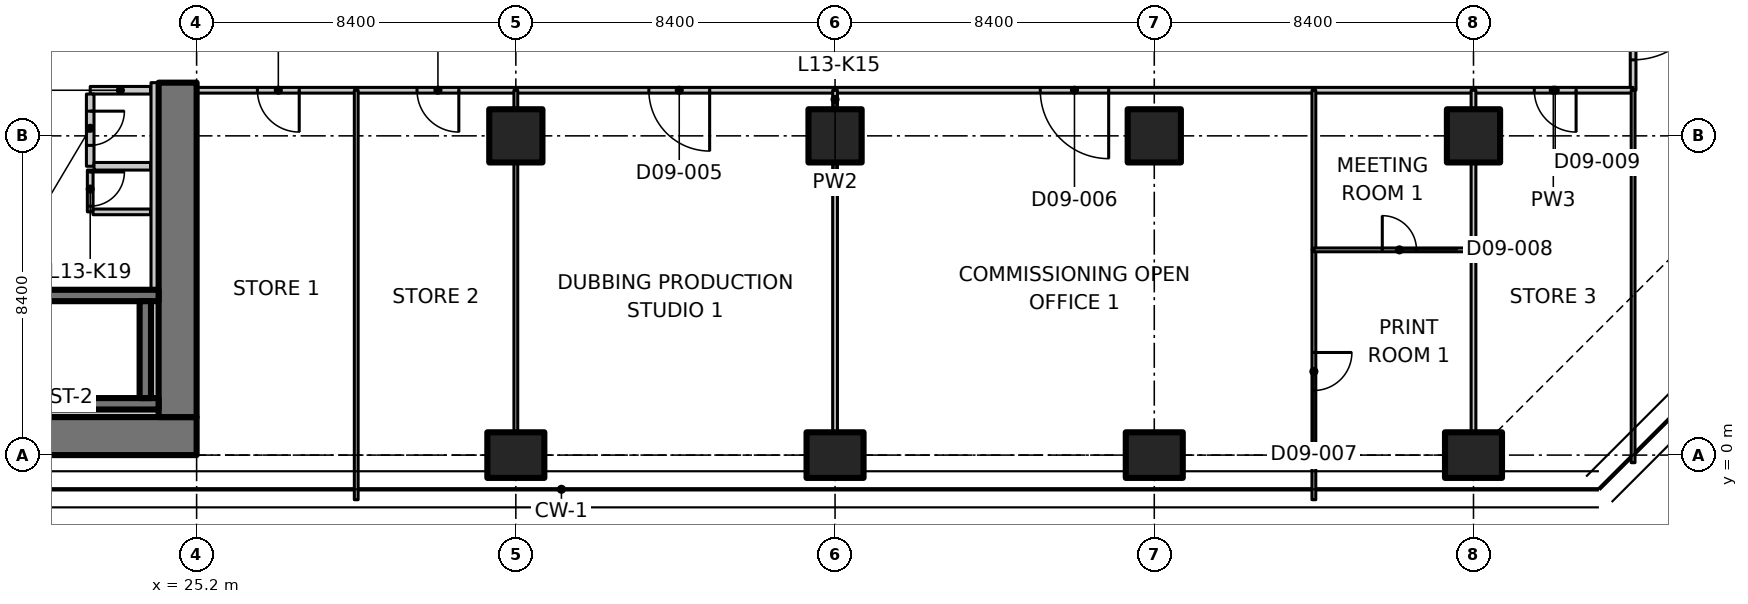
"""IFC4 building model, lengths in metres.
Left out: names, types, materials, properties, quantities, classifications, styles, units other than length and angle.
Written with IfcOpenShell. Run it as: python <this file> out.ifc"""

import sys

from ifc_helpers import new_model, si_unit, direction, frame, frame_2d, origin, origin_2d, place, context, subcontext, project, spatial, polyline, rectangle, outline, extrude, element, fill, save


model = new_model("IFC4")
c1 = context("Model", 3, precision=1e-05, world=origin(), true_north=direction((0.0, 1.0)))
c2 = subcontext(c1, "Body", "Model", "MODEL_VIEW")
j1 = project(units=[si_unit("LENGTHUNIT", "METRE"), si_unit("PLANEANGLEUNIT", "RADIAN")], contexts=[c1])
p1 = place(None, origin())
s1 = spatial("IfcSite", under=j1, at=p1, CompositionType="ELEMENT")
p2 = place(p1, origin())
s2 = spatial("IfcBuilding", under=s1, at=p2, CompositionType="ELEMENT")
p3 = place(p2, frame((0.0, 0.0, 61.7)))
s3 = spatial("IfcBuildingStorey", under=s2, at=p3, CompositionType="ELEMENT", Elevation=61.7)
p4 = place(p3, frame((33.6, 0.0, 0.0), z_axis=(0.0, 0.0, 1.0), x_axis=(0.0, 1.0, 0.0)))
e1 = element("IfcColumn", 1, at=p4, inside=s3, PredefinedType="COLUMN", context=c2, shape_type="SweptSolid", body=[
    extrude(rectangle(XDim=1.2, YDim=1.5, at=origin_2d()), origin(), (0.0, 0.0, 1.0), 3.35),
])
p5 = place(p3, frame((33.6, 8.4, 0.0), z_axis=(0.0, 0.0, 1.0), x_axis=(1.0, 0.0, 0.0)))
e2 = element("IfcColumn", 2, at=p5, inside=s3, PredefinedType="COLUMN", context=c2, shape_type="SweptSolid", body=[
    extrude(rectangle(XDim=1.4, YDim=1.4, at=origin_2d()), origin(), (0.0, 0.0, 1.0), 3.35),
])
p6 = place(p3, frame((42.0, 0.0, 0.0), z_axis=(0.0, 0.0, 1.0), x_axis=(0.0, 1.0, 0.0)))
e3 = element("IfcColumn", 3, at=p6, inside=s3, PredefinedType="COLUMN", context=c2, shape_type="SweptSolid", body=[
    extrude(rectangle(XDim=1.2, YDim=1.5, at=origin_2d()), origin(), (0.0, 0.0, 1.0), 3.35),
])
p7 = place(p3, frame((42.0, 8.4, 0.0), z_axis=(0.0, 0.0, 1.0), x_axis=(1.0, 0.0, 0.0)))
e4 = element("IfcColumn", 4, at=p7, inside=s3, PredefinedType="COLUMN", context=c2, shape_type="SweptSolid", body=[
    extrude(rectangle(XDim=1.4, YDim=1.4, at=origin_2d()), origin(), (0.0, 0.0, 1.0), 3.35),
])
p8 = place(p3, frame((50.4, 0.0, 0.0), z_axis=(0.0, 0.0, 1.0), x_axis=(0.0, 1.0, 0.0)))
e5 = element("IfcColumn", 5, at=p8, inside=s3, PredefinedType="COLUMN", context=c2, shape_type="SweptSolid", body=[
    extrude(rectangle(XDim=1.2, YDim=1.5, at=origin_2d()), origin(), (0.0, 0.0, 1.0), 3.35),
])
p9 = place(p3, frame((50.4, 8.4, 0.0), z_axis=(0.0, 0.0, 1.0), x_axis=(1.0, 0.0, 0.0)))
e6 = element("IfcColumn", 6, at=p9, inside=s3, PredefinedType="COLUMN", context=c2, shape_type="SweptSolid", body=[
    extrude(rectangle(XDim=1.4, YDim=1.4, at=origin_2d()), origin(), (0.0, 0.0, 1.0), 3.35),
])
p10 = place(p3, frame((58.8, 0.0, 0.0), z_axis=(0.0, 0.0, 1.0), x_axis=(0.0, 1.0, 0.0)))
e7 = element("IfcColumn", 7, at=p10, inside=s3, PredefinedType="COLUMN", context=c2, shape_type="SweptSolid", body=[
    extrude(rectangle(XDim=1.2, YDim=1.5, at=origin_2d()), origin(), (0.0, 0.0, 1.0), 3.35),
])
p11 = place(p3, frame((58.8, 8.4, 0.0), z_axis=(0.0, 0.0, 1.0), x_axis=(1.0, 0.0, 0.0)))
e8 = element("IfcColumn", 8, at=p11, inside=s3, PredefinedType="COLUMN", context=c2, shape_type="SweptSolid", body=[
    extrude(rectangle(XDim=1.4, YDim=1.4, at=origin_2d()), origin(), (0.0, 0.0, 1.0), 3.35),
])
p12 = place(p3, frame((6.936, 0.5, 0.0), z_axis=(0.0, 0.0, 1.0), x_axis=(1.0, 0.0, 0.0)))
e9 = element("IfcWall", 9, at=p12, inside=s3, PredefinedType="SHEAR", context=c2, shape_type="SweptSolid", body=[
    extrude(rectangle(XDim=18.264, YDim=1.0, at=frame_2d((9.132, 0.0))), origin(), (0.0, 0.0, 1.0), 3.35),
])
p13 = place(p3, frame((24.7, 1.0, 0.0), z_axis=(0.0, 0.0, 1.0), x_axis=(0.0, 1.0, 0.0)))
e10 = element("IfcWall", 10, at=p13, inside=s3, PredefinedType="SHEAR", context=c2, shape_type="SweptSolid", body=[
    extrude(rectangle(XDim=8.8, YDim=1.0, at=frame_2d((4.4, 0.0))), origin(), (0.0, 0.0, 1.0), 3.35),
])
p14 = place(p3, frame((15.8, 1.35, 0.0), z_axis=(0.0, 0.0, 1.0), x_axis=(1.0, 0.0, 0.0)))
e11 = element("IfcWall", 11, at=p14, inside=s3, PredefinedType="SHEAR", context=c2, shape_type="SweptSolid", body=[
    extrude(rectangle(XDim=8.4, YDim=0.3, at=frame_2d((4.2, 0.0))), origin(), (0.0, 0.0, 1.0), 3.35),
])
p15 = place(p3, frame((15.8, 4.2, 0.0), z_axis=(0.0, 0.0, 1.0), x_axis=(1.0, 0.0, 0.0)))
e12 = element("IfcWall", 12, at=p15, inside=s3, PredefinedType="SHEAR", context=c2, shape_type="SweptSolid", body=[
    extrude(rectangle(XDim=8.4, YDim=0.3, at=frame_2d((4.2, 0.0))), origin(), (0.0, 0.0, 1.0), 3.35),
])
p16 = place(p15, frame((0.4, 0.0, 0.0)))
e13 = element("IfcOpeningElement", 13, at=p16, cuts=e12, PredefinedType="OPENING", context=c2, shape_type="SweptSolid", body=[
    extrude(rectangle(XDim=1.0, YDim=2.1, at=frame_2d((0.5, 1.05))), frame((0.0, 0.16, 0.0), z_axis=(0.0, -1.0, 0.0), x_axis=(1.0, 0.0, 0.0)), (0.0, 0.0, 1.0), 0.32),
])
p17 = place(p3, frame((23.85, 1.5, 0.0), z_axis=(0.0, 0.0, 1.0), x_axis=(0.0, 1.0, 0.0)))
e14 = element("IfcWall", 14, at=p17, inside=s3, PredefinedType="SHEAR", context=c2, shape_type="SweptSolid", body=[
    extrude(rectangle(XDim=2.55, YDim=0.3, at=frame_2d((1.275, 0.0))), origin(), (0.0, 0.0, 1.0), 3.35),
])
p18 = place(p3, frame((23.988, 9.6, 0.0), z_axis=(0.0, 0.0, 1.0), x_axis=(-1.0, 0.0, 0.0)))
e15 = element("IfcWall", 15, at=p18, inside=s3, PredefinedType="PARTITIONING", context=c2, shape_type="SweptSolid", body=[
    extrude(rectangle(XDim=1.588, YDim=0.2, at=frame_2d((0.794, 0.0))), origin(), (0.0, 0.0, 1.0), 3.35),
])
p19 = place(p3, frame((22.4, 9.5, 0.0), z_axis=(0.0, 0.0, 1.0), x_axis=(0.0, -1.0, 0.0)))
e16 = element("IfcWall", 16, at=p19, inside=s3, PredefinedType="PARTITIONING", context=c2, shape_type="SweptSolid", body=[
    extrude(rectangle(XDim=1.9, YDim=0.2, at=frame_2d((0.95, 0.0))), origin(), (0.0, 0.0, 1.0), 3.35),
])
p20 = place(p19, frame((0.45, 0.0, 0.0)))
e17 = element("IfcOpeningElement", 17, at=p20, cuts=e16, PredefinedType="OPENING", context=c2, shape_type="SweptSolid", body=[
    extrude(rectangle(XDim=0.9, YDim=2.1, at=frame_2d((0.45, 1.05))), frame((0.0, 0.11, 0.0), z_axis=(0.0, -1.0, 0.0), x_axis=(1.0, 0.0, 0.0)), (0.0, 0.0, 1.0), 0.22),
])
p21 = place(p3, frame((22.5, 7.6, 0.0), z_axis=(0.0, 0.0, 1.0), x_axis=(1.0, 0.0, 0.0)))
e18 = element("IfcWall", 18, at=p21, inside=s3, PredefinedType="PARTITIONING", context=c2, shape_type="SweptSolid", body=[
    extrude(rectangle(XDim=1.488, YDim=0.2, at=frame_2d((0.744, 0.0))), origin(), (0.0, 0.0, 1.0), 3.35),
])
p22 = place(p3, frame((22.4, 7.5, 0.0), z_axis=(0.0, 0.0, 1.0), x_axis=(0.0, -1.0, 0.0)))
e19 = element("IfcWall", 19, at=p22, inside=s3, PredefinedType="PARTITIONING", context=c2, shape_type="SweptSolid", body=[
    extrude(rectangle(XDim=1.1, YDim=0.15, at=frame_2d((0.55, 0.0))), origin(), (0.0, 0.0, 1.0), 3.35),
])
p23 = place(p22, frame((0.05, 0.0, 0.0)))
e20 = element("IfcOpeningElement", 20, at=p23, cuts=e19, PredefinedType="OPENING", context=c2, shape_type="SweptSolid", body=[
    extrude(rectangle(XDim=0.9, YDim=2.1, at=frame_2d((0.45, 1.05))), frame((0.0, 0.085, 0.0), z_axis=(0.0, -1.0, 0.0), x_axis=(1.0, 0.0, 0.0)), (0.0, 0.0, 1.0), 0.17),
])
p24 = place(p3, frame((22.475, 6.4, 0.0), z_axis=(0.0, 0.0, 1.0), x_axis=(1.0, 0.0, 0.0)))
e21 = element("IfcWall", 21, at=p24, inside=s3, PredefinedType="PARTITIONING", context=c2, shape_type="SweptSolid", body=[
    extrude(rectangle(XDim=1.513, YDim=0.15, at=frame_2d((0.756, 0.0))), origin(), (0.0, 0.0, 1.0), 3.35),
])
p25 = place(p3, frame((13.35, 1.1, 0.0), z_axis=(0.0, 0.0, 1.0), x_axis=(1.0, 0.0, 0.0)))
e22 = element("IfcWall", 22, at=p25, inside=s3, PredefinedType="PARTITIONING", context=c2, shape_type="SweptSolid", body=[
    extrude(rectangle(XDim=10.85, YDim=0.2, at=frame_2d((5.425, 0.0))), origin(), (0.0, 0.0, 1.0), 3.35),
])
p26 = place(p3, frame((24.1, 1.5, 0.0), z_axis=(0.0, 0.0, 1.0), x_axis=(0.0, 1.0, 0.0)))
e23 = element("IfcWall", 23, at=p26, inside=s3, PredefinedType="PARTITIONING", context=c2, shape_type="SweptSolid", body=[
    extrude(rectangle(XDim=2.55, YDim=0.2, at=frame_2d((1.275, 0.0))), origin(), (0.0, 0.0, 1.0), 3.35),
])
p27 = place(p3, frame((24.1, 4.35, 0.0), z_axis=(0.0, 0.0, 1.0), x_axis=(0.0, 1.0, 0.0)))
e24 = element("IfcWall", 24, at=p27, inside=s3, PredefinedType="PARTITIONING", context=c2, shape_type="SweptSolid", body=[
    extrude(rectangle(XDim=5.45, YDim=0.2, at=frame_2d((2.725, 0.0))), origin(), (0.0, 0.0, 1.0), 3.35),
])
p28 = place(p3, frame((29.4, 9.6, 0.0), z_axis=(0.0, 0.0, 1.0), x_axis=(-1.0, 0.0, 0.0)))
e25 = element("IfcWall", 25, at=p28, inside=s3, PredefinedType="PARTITIONING", context=c2, shape_type="SweptSolid", body=[
    extrude(rectangle(XDim=4.2, YDim=0.15, at=frame_2d((2.1, 0.0))), origin(), (0.0, 0.0, 1.0), 3.33),
])
p29 = place(p28, frame((1.5, 0.0, 0.0)))
e26 = element("IfcOpeningElement", 26, at=p29, cuts=e25, PredefinedType="OPENING", context=c2, shape_type="SweptSolid", body=[
    extrude(rectangle(XDim=1.1, YDim=2.1, at=frame_2d((0.55, 1.05))), frame((0.0, 0.085, 0.0), z_axis=(0.0, -1.0, 0.0), x_axis=(1.0, 0.0, 0.0)), (0.0, 0.0, 1.0), 0.17),
])
p30 = place(p3, frame((63.0, 13.0, 0.0), z_axis=(0.0, 0.0, 1.0), x_axis=(0.0, -1.0, 0.0)))
e27 = element("IfcWall", 27, at=p30, inside=s3, PredefinedType="PARTITIONING", context=c2, shape_type="SweptSolid", body=[
    extrude(rectangle(XDim=3.4, YDim=0.15, at=frame_2d((1.7, 0.0))), origin(), (0.0, 0.0, 1.0), 3.33),
])
p31 = place(p30, frame((0.6, 0.0, 0.0)))
e28 = element("IfcOpeningElement", 28, at=p31, cuts=e27, PredefinedType="OPENING", context=c2, shape_type="SweptSolid", body=[
    extrude(rectangle(XDim=2.0, YDim=2.4, at=frame_2d((1.0, 1.2))), frame((0.0, 0.085, 0.0), z_axis=(0.0, -1.0, 0.0), x_axis=(1.0, 0.0, 0.0)), (0.0, 0.0, 1.0), 0.17),
])
p32 = place(p3, frame((33.6, 9.6, 0.0), z_axis=(0.0, 0.0, 1.0), x_axis=(-1.0, 0.0, 0.0)))
e29 = element("IfcWall", 29, at=p32, inside=s3, PredefinedType="PARTITIONING", context=c2, shape_type="SweptSolid", body=[
    extrude(rectangle(XDim=4.2, YDim=0.15, at=frame_2d((2.1, 0.0))), origin(), (0.0, 0.0, 1.0), 3.33),
])
p33 = place(p32, frame((1.5, 0.0, 0.0)))
e30 = element("IfcOpeningElement", 30, at=p33, cuts=e29, PredefinedType="OPENING", context=c2, shape_type="SweptSolid", body=[
    extrude(rectangle(XDim=1.1, YDim=2.1, at=frame_2d((0.55, 1.05))), frame((0.0, 0.085, 0.0), z_axis=(0.0, -1.0, 0.0), x_axis=(1.0, 0.0, 0.0)), (0.0, 0.0, 1.0), 0.17),
])
p34 = place(p3, frame((42.0, 9.6, 0.0), z_axis=(0.0, 0.0, 1.0), x_axis=(-1.0, 0.0, 0.0)))
e31 = element("IfcWall", 31, at=p34, inside=s3, PredefinedType="PARTITIONING", context=c2, shape_type="SweptSolid", body=[
    extrude(rectangle(XDim=8.4, YDim=0.15, at=frame_2d((4.2, 0.0))), origin(), (0.0, 0.0, 1.0), 3.33),
])
p35 = place(p34, frame((3.3, 0.0, 0.0)))
e32 = element("IfcOpeningElement", 32, at=p35, cuts=e31, PredefinedType="OPENING", context=c2, shape_type="SweptSolid", body=[
    extrude(rectangle(XDim=1.6, YDim=2.1, at=frame_2d((0.8, 1.05))), frame((0.0, 0.085, 0.0), z_axis=(0.0, -1.0, 0.0), x_axis=(1.0, 0.0, 0.0)), (0.0, 0.0, 1.0), 0.17),
])
p36 = place(p3, frame((54.6, 9.6, 0.0), z_axis=(0.0, 0.0, 1.0), x_axis=(-1.0, 0.0, 0.0)))
e33 = element("IfcWall", 33, at=p36, inside=s3, PredefinedType="PARTITIONING", context=c2, shape_type="SweptSolid", body=[
    extrude(rectangle(XDim=12.6, YDim=0.15, at=frame_2d((6.3, 0.0))), origin(), (0.0, 0.0, 1.0), 3.33),
])
p37 = place(p36, frame((5.4, 0.0, 0.0)))
e34 = element("IfcOpeningElement", 34, at=p37, cuts=e33, PredefinedType="OPENING", context=c2, shape_type="SweptSolid", body=[
    extrude(rectangle(XDim=1.8, YDim=2.1, at=frame_2d((0.9, 1.05))), frame((0.0, 0.085, 0.0), z_axis=(0.0, -1.0, 0.0), x_axis=(1.0, 0.0, 0.0)), (0.0, 0.0, 1.0), 0.17),
])
p38 = place(p3, frame((58.8, 9.6, 0.0), z_axis=(0.0, 0.0, 1.0), x_axis=(-1.0, 0.0, 0.0)))
e35 = element("IfcWall", 35, at=p38, inside=s3, PredefinedType="PARTITIONING", context=c2, shape_type="SweptSolid", body=[
    extrude(rectangle(XDim=4.2, YDim=0.15, at=frame_2d((2.1, 0.0))), origin(), (0.0, 0.0, 1.0), 3.33),
])
p39 = place(p3, frame((63.0, 9.6, 0.0), z_axis=(0.0, 0.0, 1.0), x_axis=(-1.0, 0.0, 0.0)))
e36 = element("IfcWall", 36, at=p39, inside=s3, PredefinedType="PARTITIONING", context=c2, shape_type="SweptSolid", body=[
    extrude(rectangle(XDim=4.2, YDim=0.15, at=frame_2d((2.1, 0.0))), origin(), (0.0, 0.0, 1.0), 3.33),
])
p40 = place(p39, frame((1.5, 0.0, 0.0)))
e37 = element("IfcOpeningElement", 37, at=p40, cuts=e36, PredefinedType="OPENING", context=c2, shape_type="SweptSolid", body=[
    extrude(rectangle(XDim=1.1, YDim=2.1, at=frame_2d((0.55, 1.05))), frame((0.0, 0.085, 0.0), z_axis=(0.0, -1.0, 0.0), x_axis=(1.0, 0.0, 0.0)), (0.0, 0.0, 1.0), 0.17),
])
p41 = place(p3, frame((63.0, -0.2, 0.0), z_axis=(0.0, 0.0, 1.0), x_axis=(0.0, 1.0, 0.0)))
e38 = element("IfcWall", 38, at=p41, inside=s3, PredefinedType="PARTITIONING", context=c2, shape_type="SweptSolid", body=[
    extrude(outline(polyline([(0.0, 0.0), (9.8, 0.0), (9.8, 3.33), (5.066, 3.33), (5.064, 2.98), (3.736, 2.98), (3.734, 3.33), (0.0, 3.33), (0.0, 0.0)])), frame((0.0, 0.05, 0.0), z_axis=(0.0, -1.0, 0.0), x_axis=(1.0, 0.0, 0.0)), (0.0, 0.0, 1.0), 0.1),
])
p42 = place(p3, frame((29.4, 9.6, 0.0), z_axis=(0.0, 0.0, 1.0), x_axis=(0.0, -1.0, 0.0)))
e39 = element("IfcWall", 39, at=p42, inside=s3, PredefinedType="PARTITIONING", context=c2, shape_type="SweptSolid", body=[
    extrude(outline(polyline([(0.0, 0.0), (10.774, 0.0), (10.774, 3.33), (10.7, 3.33), (10.05, 3.33), (10.048, 2.98), (9.152, 2.98), (9.15, 3.33), (0.0, 3.33), (0.0, 0.0)])), frame((0.0, 0.05, 0.0), z_axis=(0.0, -1.0, 0.0), x_axis=(1.0, 0.0, 0.0)), (0.0, 0.0, 1.0), 0.1),
])
p43 = place(p3, frame((33.6, 9.6, 0.0), z_axis=(0.0, 0.0, 1.0), x_axis=(0.0, -1.0, 0.0)))
e40 = element("IfcWall", 40, at=p43, inside=s3, PredefinedType="PARTITIONING", context=c2, shape_type="SweptSolid", body=[
    extrude(rectangle(XDim=0.48, YDim=0.1, at=frame_2d((0.24, 0.0))), origin(), (0.0, 0.0, 1.0), 3.33),
])
p44 = place(p3, frame((33.6, 7.68, 0.0), z_axis=(0.0, 0.0, 1.0), x_axis=(0.0, -1.0, 0.0)))
e41 = element("IfcWall", 41, at=p44, inside=s3, PredefinedType="PARTITIONING", context=c2, shape_type="SweptSolid", body=[
    extrude(rectangle(XDim=7.06, YDim=0.1, at=frame_2d((3.53, 0.0))), origin(), (0.0, 0.0, 1.0), 3.33),
])
p45 = place(p3, frame((42.0, 9.6, 0.0), z_axis=(0.0, 0.0, 1.0), x_axis=(0.0, -1.0, 0.0)))
e42 = element("IfcWall", 42, at=p45, inside=s3, PredefinedType="PARTITIONING", context=c2, shape_type="SweptSolid", body=[
    extrude(rectangle(XDim=0.48, YDim=0.125, at=frame_2d((0.24, 0.0))), origin(), (0.0, 0.0, 1.0), 3.33),
])
p46 = place(p3, frame((42.0, 7.68, 0.0), z_axis=(0.0, 0.0, 1.0), x_axis=(0.0, -1.0, 0.0)))
e43 = element("IfcWall", 43, at=p46, inside=s3, PredefinedType="PARTITIONING", context=c2, shape_type="SweptSolid", body=[
    extrude(rectangle(XDim=7.06, YDim=0.125, at=frame_2d((3.53, 0.0))), origin(), (0.0, 0.0, 1.0), 3.33),
])
p47 = place(p3, frame((54.6, 5.4, 0.0), z_axis=(0.0, 0.0, 1.0), x_axis=(0.0, -1.0, 0.0)))
e44 = element("IfcWall", 44, at=p47, inside=s3, PredefinedType="PARTITIONING", context=c2, shape_type="SweptSolid", body=[
    extrude(outline(polyline([(0.0, 0.0), (6.574, 0.0), (6.574, 3.33), (6.5, 3.33), (5.85, 3.33), (5.848, 2.98), (4.952, 2.98), (4.95, 3.33), (0.0, 3.33), (0.0, 0.0)])), frame((0.0, 0.05, 0.0), z_axis=(0.0, -1.0, 0.0), x_axis=(1.0, 0.0, 0.0)), (0.0, 0.0, 1.0), 0.1),
])
p48 = place(p47, frame((2.7, 0.0, 0.0)))
e45 = element("IfcOpeningElement", 45, at=p48, cuts=e44, PredefinedType="OPENING", context=c2, shape_type="SweptSolid", body=[
    extrude(rectangle(XDim=1.0, YDim=2.1, at=frame_2d((0.5, 1.05))), frame((0.0, 0.06, 0.0), z_axis=(0.0, -1.0, 0.0), x_axis=(1.0, 0.0, 0.0)), (0.0, 0.0, 1.0), 0.12),
])
p49 = place(p3, frame((54.6, 9.6, 0.0), z_axis=(0.0, 0.0, 1.0), x_axis=(0.0, -1.0, 0.0)))
e46 = element("IfcWall", 46, at=p49, inside=s3, PredefinedType="PARTITIONING", context=c2, shape_type="SweptSolid", body=[
    extrude(rectangle(XDim=4.2, YDim=0.1, at=frame_2d((2.1, 0.0))), origin(), (0.0, 0.0, 1.0), 3.33),
])
p50 = place(p3, frame((54.6, 5.4, 0.0), z_axis=(0.0, 0.0, 1.0), x_axis=(1.0, 0.0, 0.0)))
e47 = element("IfcWall", 47, at=p50, inside=s3, PredefinedType="PARTITIONING", context=c2, shape_type="SweptSolid", body=[
    extrude(rectangle(XDim=4.2, YDim=0.1, at=frame_2d((2.1, 0.0))), origin(), (0.0, 0.0, 1.0), 3.33),
])
p51 = place(p50, frame((1.8, 0.0, 0.0)))
e48 = element("IfcOpeningElement", 48, at=p51, cuts=e47, PredefinedType="OPENING", context=c2, shape_type="SweptSolid", body=[
    extrude(rectangle(XDim=0.9, YDim=2.1, at=frame_2d((0.45, 1.05))), frame((0.0, 0.06, 0.0), z_axis=(0.0, -1.0, 0.0), x_axis=(1.0, 0.0, 0.0)), (0.0, 0.0, 1.0), 0.12),
])
p52 = place(p3, frame((58.8, 5.4, 0.0), z_axis=(0.0, 0.0, 1.0), x_axis=(0.0, -1.0, 0.0)))
e49 = element("IfcWall", 49, at=p52, inside=s3, PredefinedType="PARTITIONING", context=c2, shape_type="SweptSolid", body=[
    extrude(rectangle(XDim=4.78, YDim=0.125, at=frame_2d((2.39, 0.0))), origin(), (0.0, 0.0, 1.0), 3.33),
])
p53 = place(p3, frame((58.8, 9.6, 0.0), z_axis=(0.0, 0.0, 1.0), x_axis=(0.0, -1.0, 0.0)))
e50 = element("IfcWall", 50, at=p53, inside=s3, PredefinedType="PARTITIONING", context=c2, shape_type="SweptSolid", body=[
    extrude(rectangle(XDim=0.48, YDim=0.125, at=frame_2d((0.24, 0.0))), origin(), (0.0, 0.0, 1.0), 3.33),
])
p54 = place(p3, frame((58.8, 7.68, 0.0), z_axis=(0.0, 0.0, 1.0), x_axis=(0.0, -1.0, 0.0)))
e51 = element("IfcWall", 51, at=p54, inside=s3, PredefinedType="PARTITIONING", context=c2, shape_type="SweptSolid", body=[
    extrude(rectangle(XDim=2.28, YDim=0.125, at=frame_2d((1.14, 0.0))), origin(), (0.0, 0.0, 1.0), 3.33),
])
p55 = place(p23, origin())
e52 = element("IfcDoor", 52, at=p55, inside=s3, OperationType="SINGLE_SWING_RIGHT", PredefinedType="DOOR", context=c2, shape_type="SweptSolid", body=[
    extrude(rectangle(XDim=0.9, YDim=2.1, at=frame_2d((0.45, 1.05))), frame((0.0, 0.025, 0.0), z_axis=(0.0, -1.0, 0.0), x_axis=(1.0, 0.0, 0.0)), (0.0, 0.0, 1.0), 0.05),
])
fill(e20, e52)
p56 = place(p20, origin())
e53 = element("IfcDoor", 53, at=p56, inside=s3, OperationType="SINGLE_SWING_LEFT", PredefinedType="DOOR", context=c2, shape_type="SweptSolid", body=[
    extrude(rectangle(XDim=0.9, YDim=2.1, at=frame_2d((0.45, 1.05))), frame((0.0, 0.025, 0.0), z_axis=(0.0, -1.0, 0.0), x_axis=(1.0, 0.0, 0.0)), (0.0, 0.0, 1.0), 0.05),
])
fill(e17, e53)
p57 = place(p31, origin())
e54 = element("IfcDoor", 54, at=p57, inside=s3, OperationType="DOUBLE_DOOR_SINGLE_SWING", PredefinedType="DOOR", context=c2, shape_type="SweptSolid", body=[
    extrude(rectangle(XDim=2.0, YDim=2.4, at=frame_2d((1.0, 1.2))), frame((0.0, 0.025, 0.0), z_axis=(0.0, -1.0, 0.0), x_axis=(1.0, 0.0, 0.0)), (0.0, 0.0, 1.0), 0.05),
])
fill(e28, e54)
p58 = place(p29, origin())
e55 = element("IfcDoor", 55, at=p58, inside=s3, OperationType="SINGLE_SWING_LEFT", PredefinedType="DOOR", context=c2, shape_type="SweptSolid", body=[
    extrude(rectangle(XDim=1.1, YDim=2.1, at=frame_2d((0.55, 1.05))), frame((0.0, 0.025, 0.0), z_axis=(0.0, -1.0, 0.0), x_axis=(1.0, 0.0, 0.0)), (0.0, 0.0, 1.0), 0.05),
])
fill(e26, e55)
p59 = place(p33, origin())
e56 = element("IfcDoor", 56, at=p59, inside=s3, OperationType="SINGLE_SWING_LEFT", PredefinedType="DOOR", context=c2, shape_type="SweptSolid", body=[
    extrude(rectangle(XDim=1.1, YDim=2.1, at=frame_2d((0.55, 1.05))), frame((0.0, 0.025, 0.0), z_axis=(0.0, -1.0, 0.0), x_axis=(1.0, 0.0, 0.0)), (0.0, 0.0, 1.0), 0.05),
])
fill(e30, e56)
p60 = place(p35, origin())
e57 = element("IfcDoor", 57, at=p60, inside=s3, OperationType="DOUBLE_DOOR_SINGLE_SWING", PredefinedType="DOOR", context=c2, shape_type="SweptSolid", body=[
    extrude(rectangle(XDim=1.6, YDim=2.1, at=frame_2d((0.8, 1.05))), frame((0.0, 0.025, 0.0), z_axis=(0.0, -1.0, 0.0), x_axis=(1.0, 0.0, 0.0)), (0.0, 0.0, 1.0), 0.05),
])
fill(e32, e57)
p61 = place(p37, origin())
e58 = element("IfcDoor", 58, at=p61, inside=s3, OperationType="DOUBLE_DOOR_SINGLE_SWING", PredefinedType="DOOR", context=c2, shape_type="SweptSolid", body=[
    extrude(rectangle(XDim=1.8, YDim=2.1, at=frame_2d((0.9, 1.05))), frame((0.0, 0.025, 0.0), z_axis=(0.0, -1.0, 0.0), x_axis=(1.0, 0.0, 0.0)), (0.0, 0.0, 1.0), 0.05),
])
fill(e34, e58)
p62 = place(p48, origin())
e59 = element("IfcDoor", 59, at=p62, inside=s3, OperationType="SINGLE_SWING_LEFT", PredefinedType="DOOR", context=c2, shape_type="SweptSolid", body=[
    extrude(rectangle(XDim=1.0, YDim=2.1, at=frame_2d((0.5, 1.05))), frame((0.0, 0.025, 0.0), z_axis=(0.0, -1.0, 0.0), x_axis=(1.0, 0.0, 0.0)), (0.0, 0.0, 1.0), 0.05),
])
fill(e45, e59)
p63 = place(p51, origin())
e60 = element("IfcDoor", 60, at=p63, inside=s3, OperationType="SINGLE_SWING_LEFT", PredefinedType="DOOR", context=c2, shape_type="SweptSolid", body=[
    extrude(rectangle(XDim=0.9, YDim=2.1, at=frame_2d((0.45, 1.05))), frame((0.0, 0.025, 0.0), z_axis=(0.0, -1.0, 0.0), x_axis=(1.0, 0.0, 0.0)), (0.0, 0.0, 1.0), 0.05),
])
fill(e48, e60)
p64 = place(p40, origin())
e61 = element("IfcDoor", 61, at=p64, inside=s3, OperationType="SINGLE_SWING_LEFT", PredefinedType="DOOR", context=c2, shape_type="SweptSolid", body=[
    extrude(rectangle(XDim=1.1, YDim=2.1, at=frame_2d((0.55, 1.05))), frame((0.0, 0.025, 0.0), z_axis=(0.0, -1.0, 0.0), x_axis=(1.0, 0.0, 0.0)), (0.0, 0.0, 1.0), 0.05),
])
fill(e37, e61)
save(model, sys.argv[1])
